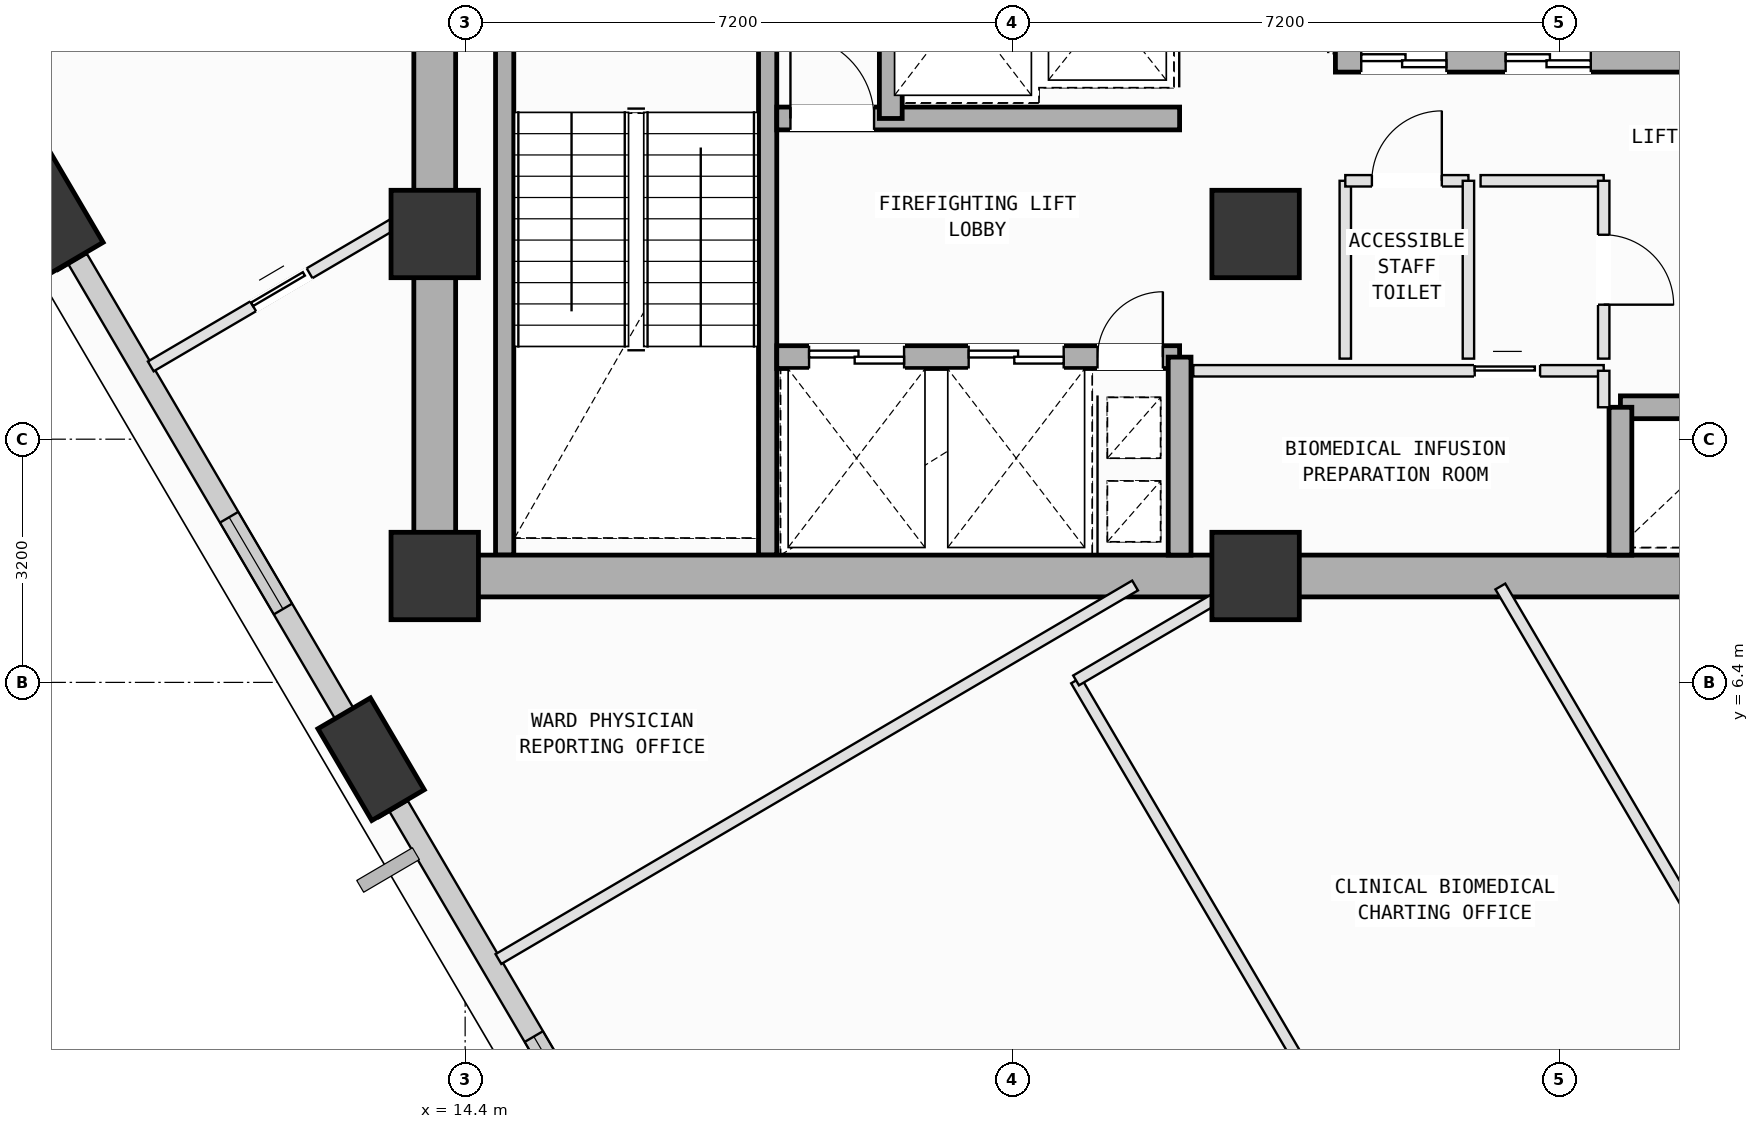
"""IFC4 building model, lengths in metres.
Left out: names, types, materials, properties, quantities, classifications, styles, units other than length and angle.
Written with IfcOpenShell. Run it as: python <this file> out.ifc"""

import sys

from ifc_helpers import new_model, si_unit, direction, frame, frame_2d, origin, origin_2d, place, context, subcontext, project, spatial, rectangle, extrude, element, fill, save


model = new_model("IFC4")
c1 = context("Model", 3, precision=1e-05, world=origin(), true_north=direction((0.0, 1.0)))
c2 = subcontext(c1, "Body", "Model", "MODEL_VIEW")
j1 = project(units=[si_unit("LENGTHUNIT", "METRE"), si_unit("PLANEANGLEUNIT", "RADIAN")], contexts=[c1])
p1 = place(None, origin())
s1 = spatial("IfcSite", under=j1, at=p1, CompositionType="ELEMENT")
p2 = place(p1, origin())
s2 = spatial("IfcBuilding", under=s1, at=p2, CompositionType="ELEMENT")
p3 = place(p2, frame((0.0, 0.0, 153.8)))
s3 = spatial("IfcBuildingStorey", under=s2, at=p3, CompositionType="ELEMENT", Elevation=153.8)
for number, where, z_axis, x_axis in (
    (1, (14.0, 7.8, 0.0), (0.0, 0.0, 1.0), (1.0, 0.0, 0.0)),
    (2, (14.0, 12.3, 0.0), (0.0, 0.0, 1.0), (1.0, 0.0, 0.0)),
    (3, (24.8, 7.8, 0.0), (0.0, 0.0, 1.0), (1.0, 0.0, 0.0)),
    (4, (24.8, 12.3, 0.0), (0.0, 0.0, 1.0), (1.0, 0.0, 0.0)),
):
    element("IfcColumn", number, at=place(p3, frame(where, z_axis=z_axis, x_axis=x_axis)), inside=s3, PredefinedType="COLUMN", context=c2, shape_type="SweptSolid", body=[
        extrude(rectangle(XDim=1.15, YDim=1.15, at=origin_2d()), origin(), (0.0, 0.0, 1.0), 4.0),
    ])
p4 = place(p3, frame((8.937, 12.591, 0.002), z_axis=(0.051167990151, -0.101122030358, 0.993557331894), x_axis=(-0.838431150667, 0.536170027731, 0.097749204363)))
e5 = element("IfcColumn", 5, at=p4, inside=s3, PredefinedType="COLUMN", context=c2, shape_type="SweptSolid", body=[
    extrude(rectangle(XDim=1.4, YDim=0.8, at=origin_2d()), origin(), (0.0, 0.0, 1.0), 4.022),
])
p5 = place(p3, frame((13.163, 5.389, 0.002), z_axis=(0.080580933826, -0.083493497699, 0.993244959185), x_axis=(-0.959036781093, 0.265012916161, 0.100082999446)))
e6 = element("IfcColumn", 6, at=p5, inside=s3, PredefinedType="COLUMN", context=c2, shape_type="SweptSolid", body=[
    extrude(rectangle(XDim=1.4, YDim=0.8, at=origin_2d()), origin(), (0.0, 0.0, 1.0), 4.023),
])
p6 = place(p3, frame((13.028, 5.619, 0.0), z_axis=(0.0, 0.0, 1.0), x_axis=(-0.506051462326, 0.862503285488, 0.0)))
e7 = element("IfcWall", 7, at=p6, inside=s3, PredefinedType="SOLIDWALL", context=c2, shape_type="SweptSolid", body=[
    extrude(rectangle(XDim=7.36, YDim=0.28, at=frame_2d((3.68, 0.0))), origin(), (0.0, 0.0, 1.0), 3.165),
])
p7 = place(p6, frame((2.025, 0.0, 0.75)))
e8 = element("IfcOpeningElement", 8, at=p7, cuts=e7, PredefinedType="OPENING", context=c2, shape_type="SweptSolid", body=[
    extrude(rectangle(XDim=1.4, YDim=1.85, at=frame_2d((0.7, 0.925))), frame((0.0, 0.15, 0.0), z_axis=(0.0, -1.0, 0.0), x_axis=(1.0, 0.0, 0.0)), (0.0, 0.0, 1.0), 0.3),
])
p8 = place(p3, frame((16.677, -0.6, 0.0), z_axis=(0.0, 0.0, 1.0), x_axis=(-0.506042627489, 0.862508469039, 0.0)))
e9 = element("IfcWall", 9, at=p8, inside=s3, PredefinedType="SOLIDWALL", context=c2, shape_type="SweptSolid", body=[
    extrude(rectangle(XDim=6.224, YDim=0.28, at=frame_2d((3.112, 0.0))), origin(), (0.0, 0.0, 1.0), 3.165),
])
p9 = place(p8, frame((0.913, 0.0, 0.75)))
e10 = element("IfcOpeningElement", 10, at=p9, cuts=e9, PredefinedType="OPENING", context=c2, shape_type="SweptSolid", body=[
    extrude(rectangle(XDim=1.8, YDim=2.05, at=frame_2d((0.9, 1.025))), frame((0.0, 0.15, 0.0), z_axis=(0.0, -1.0, 0.0), x_axis=(1.0, 0.0, 0.0)), (0.0, 0.0, 1.0), 0.3),
])
for number, where, z_axis, x_axis in (
    (11, (18.38, 15.12, 0.0), (0.0, 0.0, 1.0), (0.0, -1.0, 0.0)),
    (12, (14.92, 8.075, 0.0), (0.0, 0.0, 1.0), (0.0, 1.0, 0.0)),
):
    element("IfcWall", number, at=place(p3, frame(where, z_axis=z_axis, x_axis=x_axis)), inside=s3, PredefinedType="SOLIDWALL", context=c2, shape_type="SweptSolid", body=[
        extrude(rectangle(XDim=7.045, YDim=0.24, at=frame_2d((3.522, 0.0))), origin(), (0.0, 0.0, 1.0), 3.78),
    ])
for number, where, z_axis, x_axis in (
    (13, (14.0, 7.8, 0.0), (0.0, 0.0, 1.0), (1.0, 0.0, 0.0)),
    (14, (24.8, 7.8, 0.0), (0.0, 0.0, 1.0), (1.0, 0.0, 0.0)),
):
    element("IfcWall", number, at=place(p3, frame(where, z_axis=z_axis, x_axis=x_axis)), inside=s3, PredefinedType="SHEAR", context=c2, shape_type="SweptSolid", body=[
        extrude(rectangle(XDim=10.8, YDim=0.55, at=frame_2d((5.4, 0.0))), origin(), (0.0, 0.0, 1.0), 3.78),
    ])
p10 = place(p3, frame((14.0, 16.8, 0.0), z_axis=(0.0, 0.0, 1.0), x_axis=(0.0, -1.0, 0.0)))
e15 = element("IfcWall", 15, at=p10, inside=s3, PredefinedType="SHEAR", context=c2, shape_type="SweptSolid", body=[
    extrude(rectangle(XDim=9.0, YDim=0.55, at=frame_2d((4.5, 0.0))), origin(), (0.0, 0.0, 1.0), 3.78),
])
p11 = place(p3, frame((18.5, 10.68, 0.0), z_axis=(0.0, 0.0, 1.0), x_axis=(1.0, 0.0, 0.0)))
e16 = element("IfcWall", 16, at=p11, inside=s3, PredefinedType="SOLIDWALL", context=c2, shape_type="SweptSolid", body=[
    extrude(rectangle(XDim=5.3, YDim=0.3, at=frame_2d((2.65, 0.0))), origin(), (0.0, 0.0, 1.0), 3.78),
])
p12 = place(p11, frame((4.22, 0.0, 0.0)))
e17 = element("IfcOpeningElement", 17, at=p12, cuts=e16, PredefinedType="OPENING", context=c2, shape_type="SweptSolid", body=[
    extrude(rectangle(XDim=0.86, YDim=2.06, at=frame_2d((0.43, 1.03))), frame((0.0, 0.16, 0.0), z_axis=(0.0, -1.0, 0.0), x_axis=(1.0, 0.0, 0.0)), (0.0, 0.0, 1.0), 0.32),
])
p13 = place(p11, frame((0.425, 0.0, 0.0)))
e18 = element("IfcOpeningElement", 18, at=p13, cuts=e16, PredefinedType="OPENING", context=c2, shape_type="SweptSolid", body=[
    extrude(rectangle(XDim=1.25, YDim=2.18, at=frame_2d((0.625, 1.09))), frame((0.0, 0.16, 0.0), z_axis=(0.0, -1.0, 0.0), x_axis=(1.0, 0.0, 0.0)), (0.0, 0.0, 1.0), 0.32),
])
p14 = place(p11, frame((2.525, 0.0, 0.0)))
e19 = element("IfcOpeningElement", 19, at=p14, cuts=e16, PredefinedType="OPENING", context=c2, shape_type="SweptSolid", body=[
    extrude(rectangle(XDim=1.25, YDim=2.18, at=frame_2d((0.625, 1.09))), frame((0.0, 0.16, 0.0), z_axis=(0.0, -1.0, 0.0), x_axis=(1.0, 0.0, 0.0)), (0.0, 0.0, 1.0), 0.32),
])
p15 = place(p3, frame((18.5, 13.82, 0.0), z_axis=(0.0, 0.0, 1.0), x_axis=(1.0, 0.0, 0.0)))
e20 = element("IfcWall", 20, at=p15, inside=s3, PredefinedType="SOLIDWALL", context=c2, shape_type="SweptSolid", body=[
    extrude(rectangle(XDim=5.3, YDim=0.3, at=frame_2d((2.65, 0.0))), origin(), (0.0, 0.0, 1.0), 3.78),
])
p16 = place(p15, frame((0.18, 0.0, 0.0)))
e21 = element("IfcOpeningElement", 21, at=p16, cuts=e20, PredefinedType="OPENING", context=c2, shape_type="SweptSolid", body=[
    extrude(rectangle(XDim=1.1, YDim=2.15, at=frame_2d((0.55, 1.075))), frame((0.0, 0.16, 0.0), z_axis=(0.0, -1.0, 0.0), x_axis=(1.0, 0.0, 0.0)), (0.0, 0.0, 1.0), 0.32),
])
p17 = place(p3, frame((23.8, 8.075, 0.0), z_axis=(0.0, 0.0, 1.0), x_axis=(0.0, 1.0, 0.0)))
e22 = element("IfcWall", 22, at=p17, inside=s3, PredefinedType="SOLIDWALL", context=c2, shape_type="SweptSolid", body=[
    extrude(rectangle(XDim=2.605, YDim=0.3, at=frame_2d((1.302, 0.0))), origin(), (0.0, 0.0, 1.0), 3.78),
])
p18 = place(p3, frame((20.0, 13.82, 0.0), z_axis=(0.0, 0.0, 1.0), x_axis=(0.0, 1.0, 0.0)))
e23 = element("IfcWall", 23, at=p18, inside=s3, PredefinedType="SOLIDWALL", context=c2, shape_type="SweptSolid", body=[
    extrude(rectangle(XDim=2.73, YDim=0.3, at=frame_2d((1.365, 0.0))), origin(), (0.0, 0.0, 1.0), 3.78),
])
p19 = place(p3, frame((29.6, 10.02, 0.0), z_axis=(0.0, 0.0, 1.0), x_axis=(1.0, 0.0, 0.0)))
e24 = element("IfcWall", 24, at=p19, inside=s3, PredefinedType="SOLIDWALL", context=c2, shape_type="SweptSolid", body=[
    extrude(rectangle(XDim=1.7, YDim=0.3, at=frame_2d((0.85, 0.0))), origin(), (0.0, 0.0, 1.0), 3.78),
])
p20 = place(p3, frame((29.6, 8.075, 0.0), z_axis=(0.0, 0.0, 1.0), x_axis=(0.0, 1.0, 0.0)))
e25 = element("IfcWall", 25, at=p20, inside=s3, PredefinedType="SOLIDWALL", context=c2, shape_type="SweptSolid", body=[
    extrude(rectangle(XDim=1.945, YDim=0.3, at=frame_2d((0.973, 0.0))), origin(), (0.0, 0.0, 1.0), 3.78),
])
p21 = place(p3, frame((25.85, 14.58, 0.0), z_axis=(0.0, 0.0, 1.0), x_axis=(1.0, 0.0, 0.0)))
e26 = element("IfcWall", 26, at=p21, inside=s3, PredefinedType="SOLIDWALL", context=c2, shape_type="SweptSolid", body=[
    extrude(rectangle(XDim=5.45, YDim=0.3, at=frame_2d((2.725, 0.0))), origin(), (0.0, 0.0, 1.0), 3.78),
])
p22 = place(p21, frame((0.34, 0.0, 0.0)))
e27 = element("IfcOpeningElement", 27, at=p22, cuts=e26, PredefinedType="OPENING", context=c2, shape_type="SweptSolid", body=[
    extrude(rectangle(XDim=1.12, YDim=2.15, at=frame_2d((0.56, 1.075))), frame((0.0, 0.16, 0.0), z_axis=(0.0, -1.0, 0.0), x_axis=(1.0, 0.0, 0.0)), (0.0, 0.0, 1.0), 0.32),
])
p23 = place(p21, frame((2.24, 0.0, 0.0)))
e28 = element("IfcOpeningElement", 28, at=p23, cuts=e26, PredefinedType="OPENING", context=c2, shape_type="SweptSolid", body=[
    extrude(rectangle(XDim=1.12, YDim=2.15, at=frame_2d((0.56, 1.075))), frame((0.0, 0.16, 0.0), z_axis=(0.0, -1.0, 0.0), x_axis=(1.0, 0.0, 0.0)), (0.0, 0.0, 1.0), 0.32),
])
p24 = place(p3, frame((23.98, 10.5, 0.0), z_axis=(0.0, 0.0, 1.0), x_axis=(1.0, 0.0, 0.0)))
e29 = element("IfcWall", 29, at=p24, inside=s3, PredefinedType="PARTITIONING", context=c2, shape_type="SweptSolid", body=[
    extrude(rectangle(XDim=5.4, YDim=0.15, at=frame_2d((2.7, 0.0))), origin(), (0.0, 0.0, 1.0), 3.78),
])
p25 = place(p24, frame((3.703, 0.0, 0.0)))
e30 = element("IfcOpeningElement", 30, at=p25, cuts=e29, PredefinedType="OPENING", context=c2, shape_type="SweptSolid", body=[
    extrude(rectangle(XDim=0.86, YDim=2.06, at=frame_2d((0.43, 1.03))), frame((0.0, 0.085, 0.0), z_axis=(0.0, -1.0, 0.0), x_axis=(1.0, 0.0, 0.0)), (0.0, 0.0, 1.0), 0.17),
])
p26 = place(p3, frame((29.38, 10.5, 0.0), z_axis=(0.0, 0.0, 1.0), x_axis=(0.0, -1.0, 0.0)))
e31 = element("IfcWall", 31, at=p26, inside=s3, PredefinedType="PARTITIONING", context=c2, shape_type="SweptSolid", body=[
    extrude(rectangle(XDim=0.48, YDim=0.15, at=frame_2d((0.24, 0.0))), origin(), (0.0, 0.0, 1.0), 3.78),
])
p27 = place(p3, frame((25.98, 10.66, 0.0), z_axis=(0.0, 0.0, 1.0), x_axis=(0.0, 1.0, 0.0)))
e32 = element("IfcWall", 32, at=p27, inside=s3, PredefinedType="PARTITIONING", context=c2, shape_type="SweptSolid", body=[
    extrude(rectangle(XDim=2.34, YDim=0.15, at=frame_2d((1.17, 0.0))), origin(), (0.0, 0.0, 1.0), 3.78),
])
p28 = place(p3, frame((25.98, 13.0, 0.0), z_axis=(0.0, 0.0, 1.0), x_axis=(1.0, 0.0, 0.0)))
e33 = element("IfcWall", 33, at=p28, inside=s3, PredefinedType="PARTITIONING", context=c2, shape_type="SweptSolid", body=[
    extrude(rectangle(XDim=1.62, YDim=0.15, at=frame_2d((0.81, 0.0))), origin(), (0.0, 0.0, 1.0), 3.78),
])
p29 = place(p28, frame((0.35, 0.0, 0.0)))
e34 = element("IfcOpeningElement", 34, at=p29, cuts=e33, PredefinedType="OPENING", context=c2, shape_type="SweptSolid", body=[
    extrude(rectangle(XDim=0.92, YDim=2.1, at=frame_2d((0.46, 1.05))), frame((0.0, 0.085, 0.0), z_axis=(0.0, -1.0, 0.0), x_axis=(1.0, 0.0, 0.0)), (0.0, 0.0, 1.0), 0.17),
])
p30 = place(p3, frame((27.6, 13.0, 0.0), z_axis=(0.0, 0.0, 1.0), x_axis=(0.0, -1.0, 0.0)))
e35 = element("IfcWall", 35, at=p30, inside=s3, PredefinedType="PARTITIONING", context=c2, shape_type="SweptSolid", body=[
    extrude(rectangle(XDim=2.34, YDim=0.15, at=frame_2d((1.17, 0.0))), origin(), (0.0, 0.0, 1.0), 3.78),
])
p31 = place(p3, frame((27.76, 13.0, 0.0), z_axis=(0.0, 0.0, 1.0), x_axis=(1.0, 0.0, 0.0)))
e36 = element("IfcWall", 36, at=p31, inside=s3, PredefinedType="PARTITIONING", context=c2, shape_type="SweptSolid", body=[
    extrude(rectangle(XDim=1.62, YDim=0.15, at=frame_2d((0.81, 0.0))), origin(), (0.0, 0.0, 1.0), 3.78),
])
p32 = place(p3, frame((29.38, 13.0, 0.0), z_axis=(0.0, 0.0, 1.0), x_axis=(0.0, -1.0, 0.0)))
e37 = element("IfcWall", 37, at=p32, inside=s3, PredefinedType="PARTITIONING", context=c2, shape_type="SweptSolid", body=[
    extrude(rectangle(XDim=2.34, YDim=0.15, at=frame_2d((1.17, 0.0))), origin(), (0.0, 0.0, 1.0), 3.78),
])
p33 = place(p32, frame((0.71, 0.0, 0.0)))
e38 = element("IfcOpeningElement", 38, at=p33, cuts=e37, PredefinedType="OPENING", context=c2, shape_type="SweptSolid", body=[
    extrude(rectangle(XDim=0.92, YDim=2.1, at=frame_2d((0.46, 1.05))), frame((0.0, 0.085, 0.0), z_axis=(0.0, -1.0, 0.0), x_axis=(1.0, 0.0, 0.0)), (0.0, 0.0, 1.0), 0.17),
])
p34 = place(p3, frame((28.478, -3.868, 0.0), z_axis=(0.0, 0.0, 1.0), x_axis=(-0.506072235551, 0.862491097, 0.0)))
e39 = element("IfcWall", 39, at=p34, inside=s3, PredefinedType="PARTITIONING", context=c2, shape_type="SweptSolid", body=[
    extrude(rectangle(XDim=11.935, YDim=0.15, at=frame_2d((5.968, 0.0))), origin(), (0.0, 0.0, 1.0), 3.78),
])
p35 = place(p3, frame((22.438, 6.426, 0.0), z_axis=(0.0, 0.0, 1.0), x_axis=(0.862692781394, 0.505728350926, 0.0)))
e40 = element("IfcWall", 40, at=p35, inside=s3, PredefinedType="PARTITIONING", context=c2, shape_type="SweptSolid", body=[
    extrude(rectangle(XDim=2.124, YDim=0.15, at=frame_2d((1.062, 0.0))), origin(), (0.0, 0.0, 1.0), 3.78),
])
p36 = place(p3, frame((28.02, 7.662, 0.0), z_axis=(0.0, 0.0, 1.0), x_axis=(0.506063633063, -0.862496144508, 0.0)))
e41 = element("IfcWall", 41, at=p36, inside=s3, PredefinedType="PARTITIONING", context=c2, shape_type="SweptSolid", body=[
    extrude(rectangle(XDim=10.177, YDim=0.15, at=frame_2d((5.088, 0.0))), origin(), (0.0, 0.0, 1.0), 3.78),
])
p37 = place(p36, frame((4.832, 0.0, 0.0)))
e42 = element("IfcOpeningElement", 42, at=p37, cuts=e41, PredefinedType="OPENING", context=c2, shape_type="SweptSolid", body=[
    extrude(rectangle(XDim=0.86, YDim=2.06, at=frame_2d((0.43, 1.03))), frame((0.0, 0.085, 0.0), z_axis=(0.0, -1.0, 0.0), x_axis=(1.0, 0.0, 0.0)), (0.0, 0.0, 1.0), 0.17),
])
p38 = place(p3, frame((23.214, 7.675, 0.0), z_axis=(0.0, 0.0, 1.0), x_axis=(-0.862480430276, -0.506090414245, 0.0)))
e43 = element("IfcWall", 43, at=p38, inside=s3, PredefinedType="PARTITIONING", context=c2, shape_type="SweptSolid", body=[
    extrude(rectangle(XDim=9.712, YDim=0.15, at=frame_2d((4.856, 0.0))), origin(), (0.0, 0.0, 1.0), 3.78),
])
p39 = place(p3, frame((13.329, 4.652, 0.0), z_axis=(0.0, 0.0, 1.0), x_axis=(-0.506348760588, 0.862328784543, 0.0)))
e44 = element("IfcWall", 44, at=p39, inside=s3, PredefinedType="PARTITIONING", context=c2, shape_type="SweptSolid", body=[
    extrude(rectangle(XDim=0.986, YDim=0.15, at=frame_2d((0.493, 0.0))), origin(), (0.0, 0.0, 1.0), 3.165),
])
p40 = place(p3, frame((10.264, 10.558, 0.0), z_axis=(0.0, 0.0, 1.0), x_axis=(0.862518129621, 0.506026161453, 0.0)))
e45 = element("IfcWall", 45, at=p40, inside=s3, PredefinedType="PARTITIONING", context=c2, shape_type="SweptSolid", body=[
    extrude(rectangle(XDim=3.984, YDim=0.15, at=frame_2d((1.992, 0.0))), origin(), (0.0, 0.0, 1.0), 3.78),
])
p41 = place(p40, frame((1.562, 0.0, 0.0)))
e46 = element("IfcOpeningElement", 46, at=p41, cuts=e45, PredefinedType="OPENING", context=c2, shape_type="SweptSolid", body=[
    extrude(rectangle(XDim=0.86, YDim=2.06, at=frame_2d((0.43, 1.03))), frame((0.0, 0.085, 0.0), z_axis=(0.0, -1.0, 0.0), x_axis=(1.0, 0.0, 0.0)), (0.0, 0.0, 1.0), 0.17),
])
p42 = place(p3, frame((9.105, 11.851, 0.0), z_axis=(0.0, 0.0, 1.0), x_axis=(-0.506288159859, 0.862364365675, 0.0)))
e47 = element("IfcWall", 47, at=p42, inside=s3, PredefinedType="PARTITIONING", context=c2, shape_type="SweptSolid", body=[
    extrude(rectangle(XDim=0.991, YDim=0.15, at=frame_2d((0.496, 0.0))), origin(), (0.0, 0.0, 1.0), 3.165),
])
p43 = place(p7, origin())
e48 = element("IfcWindow", 48, at=p43, inside=s3, PartitioningType="SINGLE_PANEL", PredefinedType="WINDOW", context=c2, shape_type="SweptSolid", body=[
    extrude(rectangle(XDim=1.4, YDim=1.85, at=frame_2d((0.7, 0.925))), frame((0.0, 0.03, 0.0), z_axis=(0.0, -1.0, 0.0), x_axis=(1.0, 0.0, 0.0)), (0.0, 0.0, 1.0), 0.06),
])
fill(e8, e48)
p44 = place(p9, origin())
e49 = element("IfcWindow", 49, at=p44, inside=s3, PartitioningType="SINGLE_PANEL", PredefinedType="WINDOW", context=c2, shape_type="SweptSolid", body=[
    extrude(rectangle(XDim=1.8, YDim=2.05, at=frame_2d((0.9, 1.025))), frame((0.0, 0.03, 0.0), z_axis=(0.0, -1.0, 0.0), x_axis=(1.0, 0.0, 0.0)), (0.0, 0.0, 1.0), 0.06),
])
fill(e10, e49)
p45 = place(p12, origin())
e50 = element("IfcDoor", 50, at=p45, inside=s3, OperationType="SINGLE_SWING_RIGHT", PredefinedType="DOOR", context=c2, shape_type="SweptSolid", body=[
    extrude(rectangle(XDim=0.86, YDim=2.06, at=frame_2d((0.43, 1.03))), frame((0.0, 0.025, 0.0), z_axis=(0.0, -1.0, 0.0), x_axis=(1.0, 0.0, 0.0)), (0.0, 0.0, 1.0), 0.05),
])
fill(e17, e50)
p46 = place(p16, origin())
e51 = element("IfcDoor", 51, at=p46, inside=s3, OperationType="SINGLE_SWING_LEFT", PredefinedType="DOOR", context=c2, shape_type="SweptSolid", body=[
    extrude(rectangle(XDim=1.1, YDim=2.15, at=frame_2d((0.55, 1.075))), frame((0.0, 0.025, 0.0), z_axis=(0.0, -1.0, 0.0), x_axis=(1.0, 0.0, 0.0)), (0.0, 0.0, 1.0), 0.05),
])
fill(e21, e51)
p47 = place(p13, origin())
e52 = element("IfcDoor", 52, at=p47, inside=s3, OperationType="DOUBLE_DOOR_SLIDING", PredefinedType="DOOR", context=c2, shape_type="SweptSolid", body=[
    extrude(rectangle(XDim=1.25, YDim=2.18, at=frame_2d((0.625, 1.09))), frame((0.0, 0.025, 0.0), z_axis=(0.0, -1.0, 0.0), x_axis=(1.0, 0.0, 0.0)), (0.0, 0.0, 1.0), 0.05),
])
fill(e18, e52)
p48 = place(p14, origin())
e53 = element("IfcDoor", 53, at=p48, inside=s3, OperationType="DOUBLE_DOOR_SLIDING", PredefinedType="DOOR", context=c2, shape_type="SweptSolid", body=[
    extrude(rectangle(XDim=1.25, YDim=2.18, at=frame_2d((0.625, 1.09))), frame((0.0, 0.025, 0.0), z_axis=(0.0, -1.0, 0.0), x_axis=(1.0, 0.0, 0.0)), (0.0, 0.0, 1.0), 0.05),
])
fill(e19, e53)
p49 = place(p22, origin())
e54 = element("IfcDoor", 54, at=p49, inside=s3, OperationType="DOUBLE_DOOR_SLIDING", PredefinedType="DOOR", context=c2, shape_type="SweptSolid", body=[
    extrude(rectangle(XDim=1.12, YDim=2.15, at=frame_2d((0.56, 1.075))), frame((0.0, 0.025, 0.0), z_axis=(0.0, -1.0, 0.0), x_axis=(1.0, 0.0, 0.0)), (0.0, 0.0, 1.0), 0.05),
])
fill(e27, e54)
p50 = place(p23, origin())
e55 = element("IfcDoor", 55, at=p50, inside=s3, OperationType="DOUBLE_DOOR_SLIDING", PredefinedType="DOOR", context=c2, shape_type="SweptSolid", body=[
    extrude(rectangle(XDim=1.12, YDim=2.15, at=frame_2d((0.56, 1.075))), frame((0.0, 0.025, 0.0), z_axis=(0.0, -1.0, 0.0), x_axis=(1.0, 0.0, 0.0)), (0.0, 0.0, 1.0), 0.05),
])
fill(e28, e55)
p51 = place(p29, origin())
e56 = element("IfcDoor", 56, at=p51, inside=s3, OperationType="SINGLE_SWING_RIGHT", PredefinedType="DOOR", context=c2, shape_type="SweptSolid", body=[
    extrude(rectangle(XDim=0.92, YDim=2.1, at=frame_2d((0.46, 1.05))), frame((0.0, 0.025, 0.0), z_axis=(0.0, -1.0, 0.0), x_axis=(1.0, 0.0, 0.0)), (0.0, 0.0, 1.0), 0.05),
])
fill(e34, e56)
p52 = place(p33, origin())
e57 = element("IfcDoor", 57, at=p52, inside=s3, OperationType="SINGLE_SWING_RIGHT", PredefinedType="DOOR", context=c2, shape_type="SweptSolid", body=[
    extrude(rectangle(XDim=0.92, YDim=2.1, at=frame_2d((0.46, 1.05))), frame((0.0, 0.025, 0.0), z_axis=(0.0, -1.0, 0.0), x_axis=(1.0, 0.0, 0.0)), (0.0, 0.0, 1.0), 0.05),
])
fill(e38, e57)
p53 = place(p25, origin())
e58 = element("IfcDoor", 58, at=p53, inside=s3, OperationType="SLIDING_TO_LEFT", PredefinedType="DOOR", context=c2, shape_type="SweptSolid", body=[
    extrude(rectangle(XDim=0.86, YDim=2.06, at=frame_2d((0.43, 1.03))), frame((0.0, 0.025, 0.0), z_axis=(0.0, -1.0, 0.0), x_axis=(1.0, 0.0, 0.0)), (0.0, 0.0, 1.0), 0.05),
])
fill(e30, e58)
p54 = place(p41, origin())
e59 = element("IfcDoor", 59, at=p54, inside=s3, OperationType="SLIDING_TO_LEFT", PredefinedType="DOOR", context=c2, shape_type="SweptSolid", body=[
    extrude(rectangle(XDim=0.86, YDim=2.06, at=frame_2d((0.43, 1.03))), frame((0.0, 0.025, 0.0), z_axis=(0.0, -1.0, 0.0), x_axis=(1.0, 0.0, 0.0)), (0.0, 0.0, 1.0), 0.05),
])
fill(e46, e59)
save(model, sys.argv[1])
